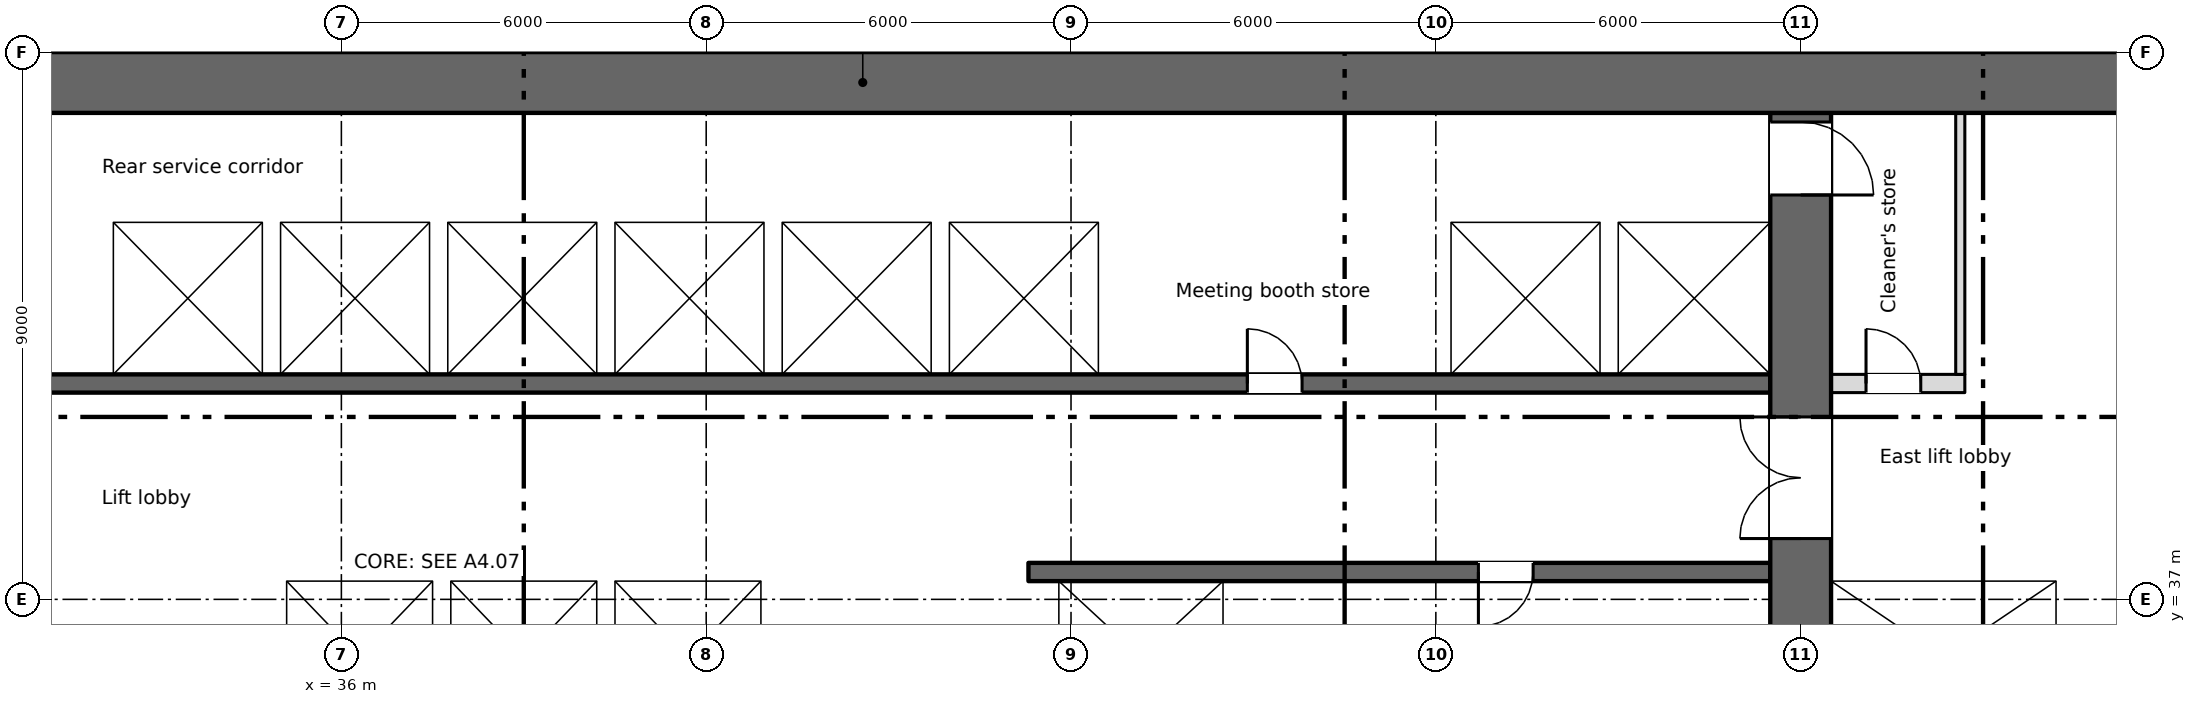
"""IFC4 building model, lengths in metres.
Left out: names, types, materials, properties, quantities, classifications, styles, units other than length and angle.
Written with IfcOpenShell. Run it as: python <this file> out.ifc"""

import sys

from ifc_helpers import new_model, si_unit, direction, frame, frame_2d, origin, place, context, subcontext, project, spatial, rectangle, extrude, element, fill, save


model = new_model("IFC4")
c1 = context("Model", 3, precision=1e-05, world=origin(), true_north=direction((0.0, 1.0)))
c2 = subcontext(c1, "Body", "Model", "MODEL_VIEW")
j1 = project(units=[si_unit("LENGTHUNIT", "METRE"), si_unit("PLANEANGLEUNIT", "RADIAN")], contexts=[c1])
p1 = place(None, origin())
s1 = spatial("IfcSite", under=j1, at=p1, CompositionType="ELEMENT")
p2 = place(p1, origin())
s2 = spatial("IfcBuilding", under=s1, at=p2, CompositionType="ELEMENT")
p3 = place(p2, frame((0.0, 0.0, 26.25)))
s3 = spatial("IfcBuildingStorey", under=s2, at=p3, CompositionType="ELEMENT", Elevation=26.25)
p4 = place(p3, frame((5.55, 45.5, 0.0), z_axis=(0.0, 0.0, 1.0), x_axis=(1.0, 0.0, 0.0)))
e1 = element("IfcWall", 1, at=p4, inside=s3, PredefinedType="SHEAR", context=c2, shape_type="SweptSolid", body=[
    extrude(rectangle(XDim=66.9, YDim=1.0, at=frame_2d((33.45, 0.0))), origin(), (0.0, 0.0, 1.0), 3.35),
])
p5 = place(p4, frame((1.2, 0.0, 0.6)))
e2 = element("IfcOpeningElement", 2, at=p5, cuts=e1, PredefinedType="OPENING", context=c2, shape_type="SweptSolid", body=[
    extrude(rectangle(XDim=0.6, YDim=2.4, at=frame_2d((0.3, 1.2))), frame((0.0, 0.51, 0.0), z_axis=(0.0, -1.0, 0.0), x_axis=(1.0, 0.0, 0.0)), (0.0, 0.0, 1.0), 1.02),
])
p6 = place(p4, frame((7.2, 0.0, 0.6)))
e3 = element("IfcOpeningElement", 3, at=p6, cuts=e1, PredefinedType="OPENING", context=c2, shape_type="SweptSolid", body=[
    extrude(rectangle(XDim=0.6, YDim=2.4, at=frame_2d((0.3, 1.2))), frame((0.0, 0.51, 0.0), z_axis=(0.0, -1.0, 0.0), x_axis=(1.0, 0.0, 0.0)), (0.0, 0.0, 1.0), 1.02),
])
p7 = place(p3, frame((64.35, 34.8, 0.0), z_axis=(0.0, 0.0, 1.0), x_axis=(0.0, 1.0, 0.0)))
e4 = element("IfcWall", 4, at=p7, inside=s3, PredefinedType="SHEAR", context=c2, shape_type="SweptSolid", body=[
    extrude(rectangle(XDim=10.2, YDim=0.3, at=frame_2d((5.1, 0.0))), origin(), (0.0, 0.0, 1.0), 3.35),
])
p8 = place(p3, frame((60.0, 28.4, 0.0), z_axis=(0.0, 0.0, 1.0), x_axis=(0.0, 1.0, 0.0)))
e5 = element("IfcWall", 5, at=p8, inside=s3, PredefinedType="SHEAR", context=c2, shape_type="SweptSolid", body=[
    extrude(rectangle(XDim=16.6, YDim=1.0, at=frame_2d((8.3, 0.0))), origin(), (0.0, 0.0, 1.0), 3.35),
])
p9 = place(p8, frame((9.6, 0.0, 0.0)))
e6 = element("IfcOpeningElement", 6, at=p9, cuts=e5, PredefinedType="OPENING", context=c2, shape_type="SweptSolid", body=[
    extrude(rectangle(XDim=2.0, YDim=2.1, at=frame_2d((1.0, 1.05))), frame((0.0, 0.51, 0.0), z_axis=(0.0, -1.0, 0.0), x_axis=(1.0, 0.0, 0.0)), (0.0, 0.0, 1.0), 1.02),
])
p10 = place(p8, frame((15.25, 0.0, 0.0)))
e7 = element("IfcOpeningElement", 7, at=p10, cuts=e5, PredefinedType="OPENING", context=c2, shape_type="SweptSolid", body=[
    extrude(rectangle(XDim=1.2, YDim=2.1, at=frame_2d((0.6, 1.05))), frame((0.0, 0.51, 0.0), z_axis=(0.0, -1.0, 0.0), x_axis=(1.0, 0.0, 0.0)), (0.0, 0.0, 1.0), 1.02),
])
p11 = place(p3, frame((34.8, 37.45, 0.0), z_axis=(0.0, 0.0, 1.0), x_axis=(1.0, 0.0, 0.0)))
e8 = element("IfcWall", 8, at=p11, inside=s3, PredefinedType="SHEAR", context=c2, shape_type="SweptSolid", body=[
    extrude(rectangle(XDim=8.4, YDim=0.3, at=frame_2d((4.2, 0.0))), origin(), (0.0, 0.0, 1.0), 3.35),
])
p12 = place(p11, frame((0.95, 0.0, 0.0)))
e9 = element("IfcOpeningElement", 9, at=p12, cuts=e8, PredefinedType="OPENING", context=c2, shape_type="SweptSolid", body=[
    extrude(rectangle(XDim=1.1, YDim=2.1, at=frame_2d((0.55, 1.05))), frame((0.0, 0.16, 0.0), z_axis=(0.0, -1.0, 0.0), x_axis=(1.0, 0.0, 0.0)), (0.0, 0.0, 1.0), 0.32),
])
p13 = place(p11, frame((3.65, 0.0, 0.0)))
e10 = element("IfcOpeningElement", 10, at=p13, cuts=e8, PredefinedType="OPENING", context=c2, shape_type="SweptSolid", body=[
    extrude(rectangle(XDim=1.1, YDim=2.1, at=frame_2d((0.55, 1.05))), frame((0.0, 0.16, 0.0), z_axis=(0.0, -1.0, 0.0), x_axis=(1.0, 0.0, 0.0)), (0.0, 0.0, 1.0), 0.32),
])
p14 = place(p11, frame((6.35, 0.0, 0.0)))
e11 = element("IfcOpeningElement", 11, at=p14, cuts=e8, PredefinedType="OPENING", context=c2, shape_type="SweptSolid", body=[
    extrude(rectangle(XDim=1.1, YDim=2.1, at=frame_2d((0.55, 1.05))), frame((0.0, 0.16, 0.0), z_axis=(0.0, -1.0, 0.0), x_axis=(1.0, 0.0, 0.0)), (0.0, 0.0, 1.0), 0.32),
])
p15 = place(p3, frame((59.5, 37.45, 0.0), z_axis=(0.0, 0.0, 1.0), x_axis=(-1.0, 0.0, 0.0)))
e12 = element("IfcWall", 12, at=p15, inside=s3, PredefinedType="SHEAR", context=c2, shape_type="SweptSolid", body=[
    extrude(rectangle(XDim=12.2, YDim=0.3, at=frame_2d((6.1, 0.0))), origin(), (0.0, 0.0, 1.0), 3.35),
])
p16 = place(p15, frame((3.9, 0.0, 0.0)))
e13 = element("IfcOpeningElement", 13, at=p16, cuts=e12, PredefinedType="OPENING", context=c2, shape_type="SweptSolid", body=[
    extrude(rectangle(XDim=0.9, YDim=2.1, at=frame_2d((0.45, 1.05))), frame((0.0, 0.16, 0.0), z_axis=(0.0, -1.0, 0.0), x_axis=(1.0, 0.0, 0.0)), (0.0, 0.0, 1.0), 0.32),
])
p17 = place(p3, frame((60.5, 37.45, 0.0), z_axis=(0.0, 0.0, 1.0), x_axis=(1.0, 0.0, 0.0)))
e14 = element("IfcWall", 14, at=p17, inside=s3, PredefinedType="SHEAR", context=c2, shape_type="SweptSolid", body=[
    extrude(rectangle(XDim=3.7, YDim=0.3, at=frame_2d((1.85, 0.0))), origin(), (0.0, 0.0, 1.0), 3.35),
])
p18 = place(p17, frame((1.3, 0.0, 0.0)))
e15 = element("IfcOpeningElement", 15, at=p18, cuts=e14, PredefinedType="OPENING", context=c2, shape_type="SweptSolid", body=[
    extrude(rectangle(XDim=1.1, YDim=2.1, at=frame_2d((0.55, 1.05))), frame((0.0, 0.16, 0.0), z_axis=(0.0, -1.0, 0.0), x_axis=(1.0, 0.0, 0.0)), (0.0, 0.0, 1.0), 0.32),
])
for number, where, z_axis, x_axis in (
    (16, (34.95, 34.8, 0.0), (0.0, 0.0, 1.0), (0.0, 1.0, 0.0)),
    (17, (43.05, 34.8, 0.0), (0.0, 0.0, 1.0), (0.0, 1.0, 0.0)),
):
    element("IfcWall", number, at=place(p3, frame(where, z_axis=z_axis, x_axis=x_axis)), inside=s3, PredefinedType="SHEAR", context=c2, shape_type="SweptSolid", body=[
        extrude(rectangle(XDim=2.5, YDim=0.3, at=frame_2d((1.25, 0.0))), origin(), (0.0, 0.0, 1.0), 3.35),
    ])
p19 = place(p3, frame((47.55, 34.8, 0.0), z_axis=(0.0, 0.0, 1.0), x_axis=(0.0, 1.0, 0.0)))
e18 = element("IfcWall", 18, at=p19, inside=s3, PredefinedType="SHEAR", context=c2, shape_type="SweptSolid", body=[
    extrude(rectangle(XDim=2.5, YDim=0.5, at=frame_2d((1.25, 0.0))), origin(), (0.0, 0.0, 1.0), 3.35),
])
p20 = place(p3, frame((50.65, 34.8, 0.0), z_axis=(0.0, 0.0, 1.0), x_axis=(0.0, 1.0, 0.0)))
e19 = element("IfcWall", 19, at=p20, inside=s3, PredefinedType="SHEAR", context=c2, shape_type="SweptSolid", body=[
    extrude(rectangle(XDim=2.5, YDim=0.3, at=frame_2d((1.25, 0.0))), origin(), (0.0, 0.0, 1.0), 3.35),
])
p21 = place(p3, frame((18.5, 40.55, 0.0), z_axis=(0.0, 0.0, 1.0), x_axis=(1.0, 0.0, 0.0)))
e20 = element("IfcWall", 20, at=p21, inside=s3, PredefinedType="SHEAR", context=c2, shape_type="SweptSolid", body=[
    extrude(rectangle(XDim=41.0, YDim=0.3, at=frame_2d((20.5, 0.0))), origin(), (0.0, 0.0, 1.0), 3.35),
])
p22 = place(p21, frame((9.025, 0.0, 0.0)))
e21 = element("IfcOpeningElement", 21, at=p22, cuts=e20, PredefinedType="OPENING", context=c2, shape_type="SweptSolid", body=[
    extrude(rectangle(XDim=0.9, YDim=2.1, at=frame_2d((0.45, 1.05))), frame((0.0, 0.16, 0.0), z_axis=(0.0, -1.0, 0.0), x_axis=(1.0, 0.0, 0.0)), (0.0, 0.0, 1.0), 0.32),
])
p23 = place(p21, frame((32.4, 0.0, 0.0)))
e22 = element("IfcOpeningElement", 22, at=p23, cuts=e20, PredefinedType="OPENING", context=c2, shape_type="SweptSolid", body=[
    extrude(rectangle(XDim=0.9, YDim=2.1, at=frame_2d((0.45, 1.05))), frame((0.0, 0.16, 0.0), z_axis=(0.0, -1.0, 0.0), x_axis=(1.0, 0.0, 0.0)), (0.0, 0.0, 1.0), 0.32),
])
p24 = place(p21, frame((14.425, 0.0, 0.0)))
e23 = element("IfcOpeningElement", 23, at=p24, cuts=e20, PredefinedType="OPENING", context=c2, shape_type="SweptSolid", body=[
    extrude(rectangle(XDim=1.1, YDim=2.1, at=frame_2d((0.55, 1.05))), frame((0.0, 0.16, 0.0), z_axis=(0.0, -1.0, 0.0), x_axis=(1.0, 0.0, 0.0)), (0.0, 0.0, 1.0), 0.32),
])
p25 = place(p21, frame((17.175, 0.0, 0.0)))
e24 = element("IfcOpeningElement", 24, at=p25, cuts=e20, PredefinedType="OPENING", context=c2, shape_type="SweptSolid", body=[
    extrude(rectangle(XDim=1.1, YDim=2.1, at=frame_2d((0.55, 1.05))), frame((0.0, 0.16, 0.0), z_axis=(0.0, -1.0, 0.0), x_axis=(1.0, 0.0, 0.0)), (0.0, 0.0, 1.0), 0.32),
])
p26 = place(p21, frame((19.925, 0.0, 0.0)))
e25 = element("IfcOpeningElement", 25, at=p26, cuts=e20, PredefinedType="OPENING", context=c2, shape_type="SweptSolid", body=[
    extrude(rectangle(XDim=1.1, YDim=2.1, at=frame_2d((0.55, 1.05))), frame((0.0, 0.16, 0.0), z_axis=(0.0, -1.0, 0.0), x_axis=(1.0, 0.0, 0.0)), (0.0, 0.0, 1.0), 0.32),
])
p27 = place(p21, frame((22.675, 0.0, 0.0)))
e26 = element("IfcOpeningElement", 26, at=p27, cuts=e20, PredefinedType="OPENING", context=c2, shape_type="SweptSolid", body=[
    extrude(rectangle(XDim=1.1, YDim=2.1, at=frame_2d((0.55, 1.05))), frame((0.0, 0.16, 0.0), z_axis=(0.0, -1.0, 0.0), x_axis=(1.0, 0.0, 0.0)), (0.0, 0.0, 1.0), 0.32),
])
p28 = place(p21, frame((36.375, 0.0, 0.0)))
e27 = element("IfcOpeningElement", 27, at=p28, cuts=e20, PredefinedType="OPENING", context=c2, shape_type="SweptSolid", body=[
    extrude(rectangle(XDim=1.2, YDim=2.1, at=frame_2d((0.6, 1.05))), frame((0.0, 0.16, 0.0), z_axis=(0.0, -1.0, 0.0), x_axis=(1.0, 0.0, 0.0)), (0.0, 0.0, 1.0), 0.32),
])
p29 = place(p21, frame((39.15, 0.0, 0.0)))
e28 = element("IfcOpeningElement", 28, at=p29, cuts=e20, PredefinedType="OPENING", context=c2, shape_type="SweptSolid", body=[
    extrude(rectangle(XDim=1.2, YDim=2.1, at=frame_2d((0.6, 1.05))), frame((0.0, 0.16, 0.0), z_axis=(0.0, -1.0, 0.0), x_axis=(1.0, 0.0, 0.0)), (0.0, 0.0, 1.0), 0.32),
])
p30 = place(p3, frame((18.5, 43.35, 0.0), z_axis=(0.0, 0.0, 1.0), x_axis=(1.0, 0.0, 0.0)))
e29 = element("IfcWall", 29, at=p30, inside=s3, PredefinedType="SHEAR", context=c2, shape_type="SweptSolid", body=[
    extrude(rectangle(XDim=41.0, YDim=0.3, at=frame_2d((20.5, 0.0))), origin(), (0.0, 0.0, 1.0), 3.35),
])
p31 = place(p3, frame((60.5, 40.55, 0.0), z_axis=(0.0, 0.0, 1.0), x_axis=(1.0, 0.0, 0.0)))
e30 = element("IfcWall", 30, at=p31, inside=s3, PredefinedType="PARTITIONING", context=c2, shape_type="SweptSolid", body=[
    extrude(rectangle(XDim=2.2, YDim=0.3, at=frame_2d((1.1, 0.0))), origin(), (0.0, 0.0, 1.0), 3.35),
])
p32 = place(p31, frame((0.575, 0.0, 0.0)))
e31 = element("IfcOpeningElement", 31, at=p32, cuts=e30, PredefinedType="OPENING", context=c2, shape_type="SweptSolid", body=[
    extrude(rectangle(XDim=0.9, YDim=2.1, at=frame_2d((0.45, 1.05))), frame((0.0, 0.16, 0.0), z_axis=(0.0, -1.0, 0.0), x_axis=(1.0, 0.0, 0.0)), (0.0, 0.0, 1.0), 0.32),
])
for number, where, z_axis, x_axis in (
    (32, (37.65, 34.8, 0.0), (0.0, 0.0, 1.0), (0.0, 1.0, 0.0)),
    (33, (40.35, 34.8, 0.0), (0.0, 0.0, 1.0), (0.0, 1.0, 0.0)),
    (34, (32.1, 40.7, 0.0), (0.0, 0.0, 1.0), (0.0, 1.0, 0.0)),
    (35, (34.85, 40.7, 0.0), (0.0, 0.0, 1.0), (0.0, 1.0, 0.0)),
    (36, (37.6, 40.7, 0.0), (0.0, 0.0, 1.0), (0.0, 1.0, 0.0)),
    (37, (40.35, 40.7, 0.0), (0.0, 0.0, 1.0), (0.0, 1.0, 0.0)),
    (38, (43.1, 40.7, 0.0), (0.0, 0.0, 1.0), (0.0, 1.0, 0.0)),
    (39, (45.85, 40.7, 0.0), (0.0, 0.0, 1.0), (0.0, 1.0, 0.0)),
    (40, (48.6, 40.7, 0.0), (0.0, 0.0, 1.0), (0.0, 1.0, 0.0)),
    (41, (54.1, 40.7, 0.0), (0.0, 0.0, 1.0), (0.0, 1.0, 0.0)),
    (42, (56.85, 40.7, 0.0), (0.0, 0.0, 1.0), (0.0, 1.0, 0.0)),
):
    element("IfcWall", number, at=place(p3, frame(where, z_axis=z_axis, x_axis=x_axis)), inside=s3, PredefinedType="SHEAR", context=c2, shape_type="SweptSolid", body=[
        extrude(rectangle(XDim=2.5, YDim=0.3, at=frame_2d((1.25, 0.0))), origin(), (0.0, 0.0, 1.0), 3.35),
    ])
p33 = place(p3, frame((62.625, 40.7, 0.0), z_axis=(0.0, 0.0, 1.0), x_axis=(0.0, 1.0, 0.0)))
e43 = element("IfcWall", 43, at=p33, inside=s3, PredefinedType="PARTITIONING", context=c2, shape_type="SweptSolid", body=[
    extrude(rectangle(XDim=4.3, YDim=0.15, at=frame_2d((2.15, 0.0))), origin(), (0.0, 0.0, 1.0), 3.35),
])
p34 = place(p32, origin())
e44 = element("IfcDoor", 44, at=p34, inside=s3, OperationType="SINGLE_SWING_LEFT", PredefinedType="DOOR", context=c2, shape_type="SweptSolid", body=[
    extrude(rectangle(XDim=0.9, YDim=2.1, at=frame_2d((0.45, 1.05))), frame((0.0, 0.025, 0.0), z_axis=(0.0, -1.0, 0.0), x_axis=(1.0, 0.0, 0.0)), (0.0, 0.0, 1.0), 0.05),
])
fill(e31, e44)
p35 = place(p16, origin())
e45 = element("IfcDoor", 45, at=p35, inside=s3, OperationType="SINGLE_SWING_RIGHT", PredefinedType="DOOR", context=c2, shape_type="SweptSolid", body=[
    extrude(rectangle(XDim=0.9, YDim=2.1, at=frame_2d((0.45, 1.05))), frame((0.0, 0.025, 0.0), z_axis=(0.0, -1.0, 0.0), x_axis=(1.0, 0.0, 0.0)), (0.0, 0.0, 1.0), 0.05),
])
fill(e13, e45)
p36 = place(p23, origin())
e46 = element("IfcDoor", 46, at=p36, inside=s3, OperationType="SINGLE_SWING_LEFT", PredefinedType="DOOR", context=c2, shape_type="SweptSolid", body=[
    extrude(rectangle(XDim=0.9, YDim=2.1, at=frame_2d((0.45, 1.05))), frame((0.0, 0.025, 0.0), z_axis=(0.0, -1.0, 0.0), x_axis=(1.0, 0.0, 0.0)), (0.0, 0.0, 1.0), 0.05),
])
fill(e22, e46)
p37 = place(p12, origin())
e47 = element("IfcDoor", 47, at=p37, inside=s3, OperationType="SLIDING_TO_LEFT", PredefinedType="DOOR", context=c2, shape_type="SweptSolid", body=[
    extrude(rectangle(XDim=1.1, YDim=2.1, at=frame_2d((0.55, 1.05))), frame((0.0, 0.025, 0.0), z_axis=(0.0, -1.0, 0.0), x_axis=(1.0, 0.0, 0.0)), (0.0, 0.0, 1.0), 0.05),
])
fill(e9, e47)
p38 = place(p13, origin())
e48 = element("IfcDoor", 48, at=p38, inside=s3, OperationType="SLIDING_TO_LEFT", PredefinedType="DOOR", context=c2, shape_type="SweptSolid", body=[
    extrude(rectangle(XDim=1.1, YDim=2.1, at=frame_2d((0.55, 1.05))), frame((0.0, 0.025, 0.0), z_axis=(0.0, -1.0, 0.0), x_axis=(1.0, 0.0, 0.0)), (0.0, 0.0, 1.0), 0.05),
])
fill(e10, e48)
p39 = place(p14, origin())
e49 = element("IfcDoor", 49, at=p39, inside=s3, OperationType="SLIDING_TO_LEFT", PredefinedType="DOOR", context=c2, shape_type="SweptSolid", body=[
    extrude(rectangle(XDim=1.1, YDim=2.1, at=frame_2d((0.55, 1.05))), frame((0.0, 0.025, 0.0), z_axis=(0.0, -1.0, 0.0), x_axis=(1.0, 0.0, 0.0)), (0.0, 0.0, 1.0), 0.05),
])
fill(e11, e49)
p40 = place(p24, origin())
e50 = element("IfcDoor", 50, at=p40, inside=s3, OperationType="SLIDING_TO_LEFT", PredefinedType="DOOR", context=c2, shape_type="SweptSolid", body=[
    extrude(rectangle(XDim=1.1, YDim=2.1, at=frame_2d((0.55, 1.05))), frame((0.0, 0.025, 0.0), z_axis=(0.0, -1.0, 0.0), x_axis=(1.0, 0.0, 0.0)), (0.0, 0.0, 1.0), 0.05),
])
fill(e23, e50)
p41 = place(p25, origin())
e51 = element("IfcDoor", 51, at=p41, inside=s3, OperationType="SLIDING_TO_LEFT", PredefinedType="DOOR", context=c2, shape_type="SweptSolid", body=[
    extrude(rectangle(XDim=1.1, YDim=2.1, at=frame_2d((0.55, 1.05))), frame((0.0, 0.025, 0.0), z_axis=(0.0, -1.0, 0.0), x_axis=(1.0, 0.0, 0.0)), (0.0, 0.0, 1.0), 0.05),
])
fill(e24, e51)
p42 = place(p26, origin())
e52 = element("IfcDoor", 52, at=p42, inside=s3, OperationType="SLIDING_TO_LEFT", PredefinedType="DOOR", context=c2, shape_type="SweptSolid", body=[
    extrude(rectangle(XDim=1.1, YDim=2.1, at=frame_2d((0.55, 1.05))), frame((0.0, 0.025, 0.0), z_axis=(0.0, -1.0, 0.0), x_axis=(1.0, 0.0, 0.0)), (0.0, 0.0, 1.0), 0.05),
])
fill(e25, e52)
p43 = place(p27, origin())
e53 = element("IfcDoor", 53, at=p43, inside=s3, OperationType="SLIDING_TO_LEFT", PredefinedType="DOOR", context=c2, shape_type="SweptSolid", body=[
    extrude(rectangle(XDim=1.1, YDim=2.1, at=frame_2d((0.55, 1.05))), frame((0.0, 0.025, 0.0), z_axis=(0.0, -1.0, 0.0), x_axis=(1.0, 0.0, 0.0)), (0.0, 0.0, 1.0), 0.05),
])
fill(e26, e53)
p44 = place(p28, origin())
e54 = element("IfcDoor", 54, at=p44, inside=s3, OperationType="SLIDING_TO_LEFT", PredefinedType="DOOR", context=c2, shape_type="SweptSolid", body=[
    extrude(rectangle(XDim=1.2, YDim=2.1, at=frame_2d((0.6, 1.05))), frame((0.0, 0.025, 0.0), z_axis=(0.0, -1.0, 0.0), x_axis=(1.0, 0.0, 0.0)), (0.0, 0.0, 1.0), 0.05),
])
fill(e27, e54)
p45 = place(p29, origin())
e55 = element("IfcDoor", 55, at=p45, inside=s3, OperationType="SLIDING_TO_LEFT", PredefinedType="DOOR", context=c2, shape_type="SweptSolid", body=[
    extrude(rectangle(XDim=1.2, YDim=2.1, at=frame_2d((0.6, 1.05))), frame((0.0, 0.025, 0.0), z_axis=(0.0, -1.0, 0.0), x_axis=(1.0, 0.0, 0.0)), (0.0, 0.0, 1.0), 0.05),
])
fill(e28, e55)
p46 = place(p18, origin())
e56 = element("IfcDoor", 56, at=p46, inside=s3, OperationType="SLIDING_TO_LEFT", PredefinedType="DOOR", context=c2, shape_type="SweptSolid", body=[
    extrude(rectangle(XDim=1.1, YDim=2.1, at=frame_2d((0.55, 1.05))), frame((0.0, 0.025, 0.0), z_axis=(0.0, -1.0, 0.0), x_axis=(1.0, 0.0, 0.0)), (0.0, 0.0, 1.0), 0.05),
])
fill(e15, e56)
p47 = place(p9, origin())
e57 = element("IfcDoor", 57, at=p47, inside=s3, OperationType="DOUBLE_DOOR_SINGLE_SWING", PredefinedType="DOOR", context=c2, shape_type="SweptSolid", body=[
    extrude(rectangle(XDim=2.0, YDim=2.1, at=frame_2d((1.0, 1.05))), frame((0.0, 0.025, 0.0), z_axis=(0.0, -1.0, 0.0), x_axis=(1.0, 0.0, 0.0)), (0.0, 0.0, 1.0), 0.05),
])
fill(e6, e57)
p48 = place(p10, origin())
e58 = element("IfcDoor", 58, at=p48, inside=s3, OperationType="SINGLE_SWING_LEFT", PredefinedType="DOOR", context=c2, shape_type="SweptSolid", body=[
    extrude(rectangle(XDim=1.2, YDim=2.1, at=frame_2d((0.6, 1.05))), frame((0.0, 0.025, 0.0), z_axis=(0.0, -1.0, 0.0), x_axis=(1.0, 0.0, 0.0)), (0.0, 0.0, 1.0), 0.05),
])
fill(e7, e58)
save(model, sys.argv[1])
